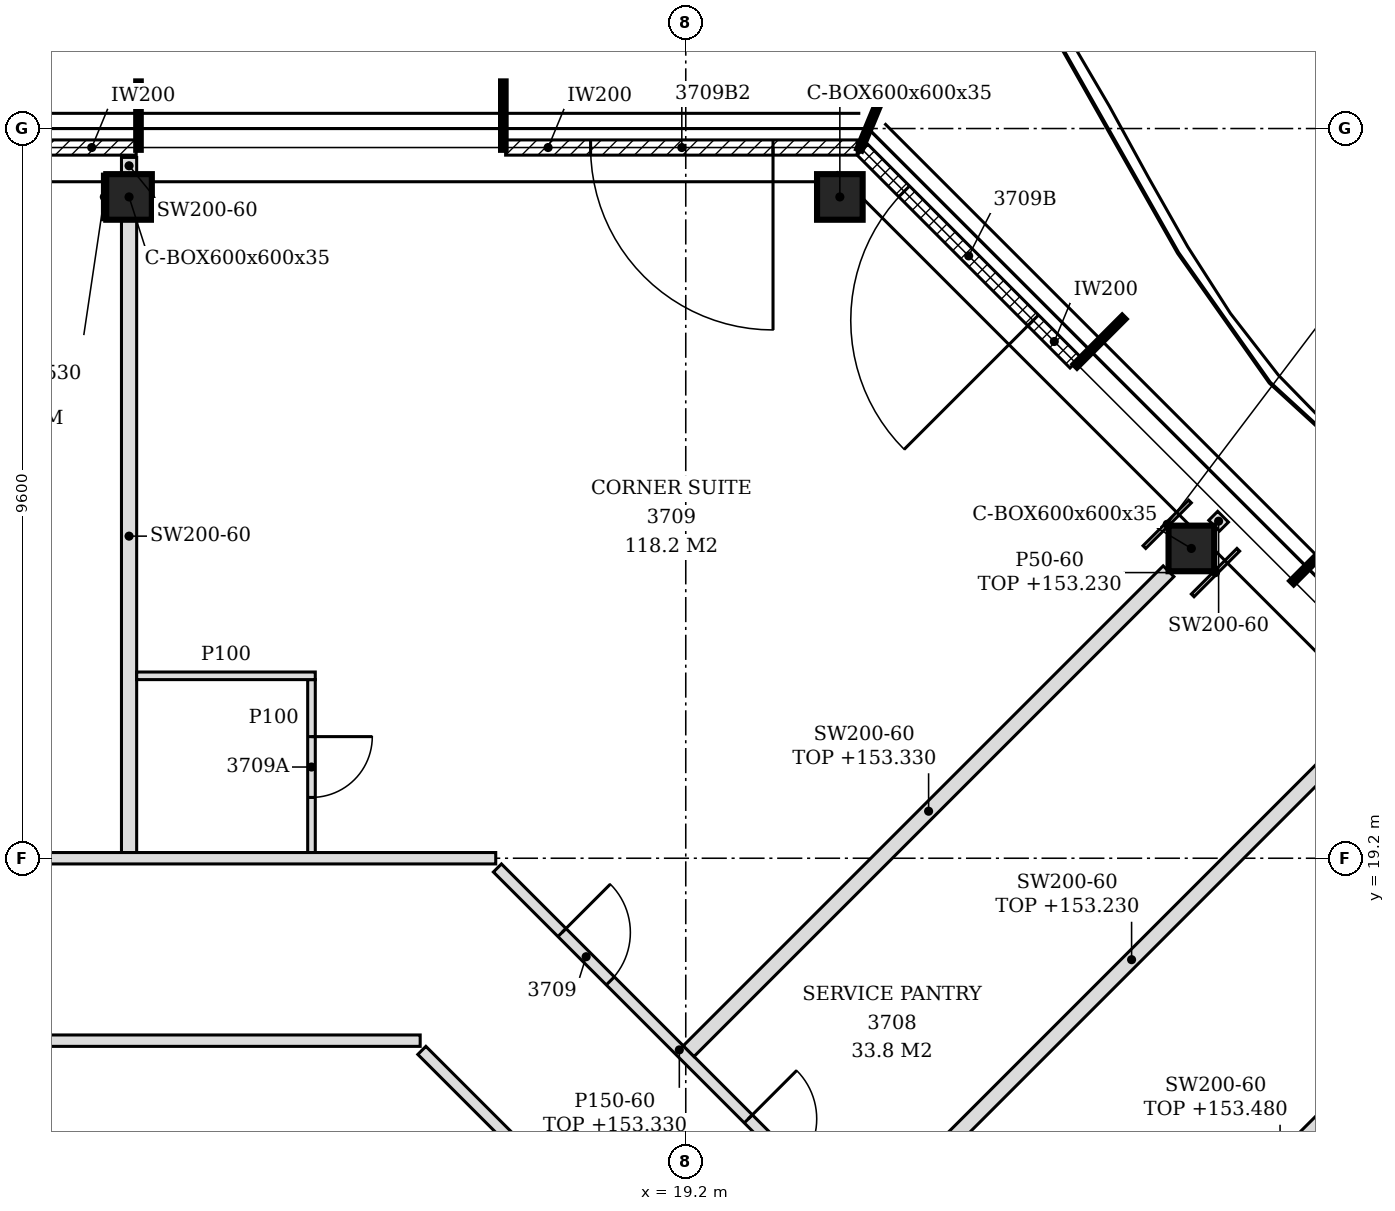
"""IFC4 building model, lengths in metres.
Left out: names, types, materials, properties, quantities, classifications, styles, units other than length and angle.
Written with IfcOpenShell. Run it as: python <this file> out.ifc"""

import sys

from ifc_helpers import new_model, si_unit, direction, frame, frame_2d, origin, origin_2d, place, context, subcontext, project, spatial, polyline, rectangle, hollow_rectangle, outline, extrude, element, fill, save


model = new_model("IFC4")
c1 = context("Model", 3, precision=1e-05, world=origin(), true_north=direction((0.0, 1.0)))
c2 = subcontext(c1, "Body", "Model", "MODEL_VIEW")
j1 = project(units=[si_unit("LENGTHUNIT", "METRE"), si_unit("PLANEANGLEUNIT", "RADIAN")], contexts=[c1])
p1 = place(None, origin())
s1 = spatial("IfcSite", under=j1, at=p1, CompositionType="ELEMENT")
p2 = place(p1, origin())
s2 = spatial("IfcBuilding", under=s1, at=p2, CompositionType="ELEMENT")
p3 = place(p2, frame((0.0, 0.0, 150.6)))
s3 = spatial("IfcBuildingStorey", under=s2, at=p3, CompositionType="ELEMENT", Elevation=150.6)
for number, where, z_axis, x_axis in (
    (1, (25.852, 23.276, -0.15), (0.0, 0.0, 1.0), (1.0, 0.0, 0.0)),
    (2, (21.227, 27.9, -0.15), (0.0, 0.0, 1.0), (1.0, 0.0, 0.0)),
    (3, (11.876, 27.9, -0.15), (0.0, 0.0, 1.0), (1.0, 0.0, 0.0)),
):
    element("IfcColumn", number, at=place(p3, frame(where, z_axis=z_axis, x_axis=x_axis)), inside=s3, PredefinedType="COLUMN", context=c2, shape_type="SweptSolid", body=[
        extrude(hollow_rectangle(XDim=0.6, YDim=0.6, WallThickness=0.035, at=origin_2d()), origin(), (0.0, 0.0, 1.0), 3.6),
    ])
p4 = place(p3, frame((24.326, 25.72, 0.0), z_axis=(0.0, 0.0, 1.0), x_axis=(-0.707106781187, 0.707106781187, 0.0)))
e4 = element("IfcWall", 4, at=p4, inside=s3, PredefinedType="NOTDEFINED", context=c2, shape_type="SweptSolid", body=[
    extrude(rectangle(XDim=3.962, YDim=0.2, at=frame_2d((1.981, 0.0))), origin(), (0.0, 0.0, 1.0), 3.45),
])
p5 = place(p4, frame((0.786, 0.0, 0.0)))
e5 = element("IfcOpeningElement", 5, at=p5, cuts=e4, PredefinedType="OPENING", context=c2, shape_type="SweptSolid", body=[
    extrude(rectangle(XDim=2.4, YDim=2.4, at=frame_2d((1.2, 1.2))), frame((0.0, 0.11, 0.0), z_axis=(0.0, -1.0, 0.0), x_axis=(1.0, 0.0, 0.0)), (0.0, 0.0, 1.0), 0.22),
])
p6 = place(p3, frame((21.457, 28.55, 0.0), z_axis=(0.0, 0.0, 1.0), x_axis=(-1.0, 0.0, 0.0)))
e6 = element("IfcWall", 6, at=p6, inside=s3, PredefinedType="NOTDEFINED", context=c2, shape_type="SweptSolid", body=[
    extrude(rectangle(XDim=4.626, YDim=0.2, at=frame_2d((2.313, 0.0))), origin(), (0.0, 0.0, 1.0), 3.45),
])
p7 = place(p6, frame((1.108, 0.0, 0.0)))
e7 = element("IfcOpeningElement", 7, at=p7, cuts=e6, PredefinedType="OPENING", context=c2, shape_type="SweptSolid", body=[
    extrude(rectangle(XDim=2.4, YDim=2.4, at=frame_2d((1.2, 1.2))), frame((0.0, 0.11, 0.0), z_axis=(0.0, -1.0, 0.0), x_axis=(1.0, 0.0, 0.0)), (0.0, 0.0, 1.0), 0.22),
])
p8 = place(p3, frame((11.97, 28.55, 0.0), z_axis=(0.0, 0.0, 1.0), x_axis=(-1.0, 0.0, 0.0)))
e8 = element("IfcWall", 8, at=p8, inside=s3, PredefinedType="NOTDEFINED", context=c2, shape_type="SweptSolid", body=[
    extrude(rectangle(XDim=4.74, YDim=0.2, at=frame_2d((2.37, 0.0))), origin(), (0.0, 0.0, 1.0), 3.45),
])
p9 = place(p8, frame((1.17, 0.0, 0.0)))
e9 = element("IfcOpeningElement", 9, at=p9, cuts=e8, PredefinedType="OPENING", context=c2, shape_type="SweptSolid", body=[
    extrude(rectangle(XDim=2.4, YDim=2.4, at=frame_2d((1.2, 1.2))), frame((0.0, 0.11, 0.0), z_axis=(0.0, -1.0, 0.0), x_axis=(1.0, 0.0, 0.0)), (0.0, 0.0, 1.0), 0.22),
])
p10 = place(p3, frame((26.272, 9.522, 0.0), z_axis=(0.0, 0.0, 1.0), x_axis=(-0.707097742657, 0.707115819601, 0.0)))
e10 = element("IfcWall", 10, at=p10, inside=s3, PredefinedType="PARTITIONING", context=c2, shape_type="SweptSolid", body=[
    extrude(rectangle(XDim=13.506, YDim=0.15, at=frame_2d((6.753, 0.0))), origin(), (0.0, 0.0, 1.0), 2.73),
])
p11 = place(p10, frame((1.398, 0.0, 0.0)))
e11 = element("IfcOpeningElement", 11, at=p11, cuts=e10, PredefinedType="OPENING", context=c2, shape_type="SweptSolid", body=[
    extrude(rectangle(XDim=0.9, YDim=2.1, at=frame_2d((0.45, 1.05))), frame((0.0, 0.085, 0.0), z_axis=(0.0, -1.0, 0.0), x_axis=(1.0, 0.0, 0.0)), (0.0, 0.0, 1.0), 0.17),
])
p12 = place(p10, frame((4.668, 0.0, 0.0)))
e12 = element("IfcOpeningElement", 12, at=p12, cuts=e10, PredefinedType="OPENING", context=c2, shape_type="SweptSolid", body=[
    extrude(rectangle(XDim=0.9, YDim=2.1, at=frame_2d((0.45, 1.05))), frame((0.0, 0.085, 0.0), z_axis=(0.0, -1.0, 0.0), x_axis=(1.0, 0.0, 0.0)), (0.0, 0.0, 1.0), 0.17),
])
p13 = place(p10, frame((7.938, 0.0, 0.0)))
e13 = element("IfcOpeningElement", 13, at=p13, cuts=e10, PredefinedType="OPENING", context=c2, shape_type="SweptSolid", body=[
    extrude(rectangle(XDim=0.9, YDim=2.1, at=frame_2d((0.45, 1.05))), frame((0.0, 0.085, 0.0), z_axis=(0.0, -1.0, 0.0), x_axis=(1.0, 0.0, 0.0)), (0.0, 0.0, 1.0), 0.17),
])
p14 = place(p10, frame((11.405, 0.0, 0.0)))
e14 = element("IfcOpeningElement", 14, at=p14, cuts=e10, PredefinedType="OPENING", context=c2, shape_type="SweptSolid", body=[
    extrude(rectangle(XDim=0.9, YDim=2.1, at=frame_2d((0.45, 1.05))), frame((0.0, 0.085, 0.0), z_axis=(0.0, -1.0, 0.0), x_axis=(1.0, 0.0, 0.0)), (0.0, 0.0, 1.0), 0.17),
])
p15 = place(p3, frame((26.174, 9.726, 0.0), z_axis=(0.0, 0.0, 1.0), x_axis=(0.707106781187, 0.707106781187, 0.0)))
e15 = element("IfcWall", 15, at=p15, inside=s3, PredefinedType="PARTITIONING", context=c2, shape_type="SweptSolid", body=[
    extrude(rectangle(XDim=9.873, YDim=0.1, at=frame_2d((4.937, 0.0))), origin(), (0.0, 0.0, 1.0), 2.88),
])
p16 = place(p15, frame((4.639, 0.0, 0.0)))
e16 = element("IfcOpeningElement", 16, at=p16, cuts=e15, PredefinedType="OPENING", context=c2, shape_type="SweptSolid", body=[
    extrude(rectangle(XDim=0.9, YDim=2.1, at=frame_2d((0.45, 1.05))), frame((0.0, 0.06, 0.0), z_axis=(0.0, -1.0, 0.0), x_axis=(1.0, 0.0, 0.0)), (0.0, 0.0, 1.0), 0.12),
])
p17 = place(p3, frame((23.862, 12.038, 0.0), z_axis=(0.0, 0.0, 1.0), x_axis=(0.707106781187, 0.707106781187, 0.0)))
e17 = element("IfcWall", 17, at=p17, inside=s3, PredefinedType="PARTITIONING", context=c2, shape_type="SweptSolid", body=[
    extrude(rectangle(XDim=8.929, YDim=0.2, at=frame_2d((4.464, 0.0))), origin(), (0.0, 0.0, 1.0), 2.88),
])
p18 = place(p3, frame((19.002, 13.398, 0.0), z_axis=(0.0, 0.0, 1.0), x_axis=(-0.707080416772, 0.707133144618, 0.0)))
e18 = element("IfcWall", 18, at=p18, inside=s3, PredefinedType="PARTITIONING", context=c2, shape_type="SweptSolid", body=[
    extrude(rectangle(XDim=4.63, YDim=0.15, at=frame_2d((2.315, 0.0))), origin(), (0.0, 0.0, 1.0), 3.45),
])
p19 = place(p3, frame((21.55, 14.35, 0.0), z_axis=(0.0, 0.0, 1.0), x_axis=(0.707106781187, 0.707106781187, 0.0)))
e19 = element("IfcWall", 19, at=p19, inside=s3, PredefinedType="PARTITIONING", context=c2, shape_type="SweptSolid", body=[
    extrude(rectangle(XDim=9.943, YDim=0.2, at=frame_2d((4.972, 0.0))), origin(), (0.0, 0.0, 1.0), 2.63),
])
p20 = place(p3, frame((19.238, 16.662, 0.0), z_axis=(0.0, 0.0, 1.0), x_axis=(0.707106781187, 0.707106781187, 0.0)))
e20 = element("IfcWall", 20, at=p20, inside=s3, PredefinedType="PARTITIONING", context=c2, shape_type="SweptSolid", body=[
    extrude(rectangle(XDim=8.929, YDim=0.2, at=frame_2d((4.464, 0.0))), origin(), (0.0, 0.0, 1.0), 2.73),
])
p21 = place(p3, frame((-1.306, 16.8, 0.0), z_axis=(0.0, 0.0, 1.0), x_axis=(1.0, 0.0, 0.0)))
e21 = element("IfcWall", 21, at=p21, inside=s3, PredefinedType="PARTITIONING", context=c2, shape_type="SweptSolid", body=[
    extrude(outline(polyline([(0.0, 0.0), (17.012, 0.0), (17.012, 3.45), (8.656, 3.45), (8.654, 2.73), (8.356, 2.73), (8.354, 3.45), (0.0, 3.45), (0.0, 0.0)])), frame((0.0, 0.075, 0.0), z_axis=(0.0, -1.0, 0.0), x_axis=(1.0, 0.0, 0.0)), (0.0, 0.0, 1.0), 0.15),
])
p22 = place(p3, frame((-2.3, 19.2, 0.0), z_axis=(0.0, 0.0, 1.0), x_axis=(1.0, 0.0, 0.0)))
e22 = element("IfcWall", 22, at=p22, inside=s3, PredefinedType="PARTITIONING", context=c2, shape_type="SweptSolid", body=[
    extrude(outline(polyline([(0.0, 0.0), (19.0, 0.0), (19.0, 2.88), (9.65, 2.88), (9.648, 2.73), (9.35, 2.73), (9.348, 2.88), (0.0, 2.88), (0.0, 0.0)])), frame((0.0, 0.075, 0.0), z_axis=(0.0, -1.0, 0.0), x_axis=(1.0, 0.0, 0.0)), (0.0, 0.0, 1.0), 0.15),
])
p23 = place(p22, frame((11.809, 0.0, 0.0)))
e23 = element("IfcOpeningElement", 23, at=p23, cuts=e22, PredefinedType="OPENING", context=c2, shape_type="SweptSolid", body=[
    extrude(rectangle(XDim=0.9, YDim=2.1, at=frame_2d((0.45, 1.05))), frame((0.0, 0.085, 0.0), z_axis=(0.0, -1.0, 0.0), x_axis=(1.0, 0.0, 0.0)), (0.0, 0.0, 1.0), 0.17),
])
p24 = place(p3, frame((11.876, 19.275, 0.0), z_axis=(0.0, 0.0, 1.0), x_axis=(0.0, 1.0, 0.0)))
e24 = element("IfcWall", 24, at=p24, inside=s3, PredefinedType="PARTITIONING", context=c2, shape_type="SweptSolid", body=[
    extrude(outline(polyline([(0.0, 0.0), (8.325, 0.0), (8.325, 3.45), (4.83, 3.45), (4.828, 2.88), (4.62, 2.88), (4.618, 3.45), (0.03, 3.45), (0.028, 2.88), (0.0, 2.88), (0.0, 0.0)])), frame((0.0, 0.1, 0.0), z_axis=(0.0, -1.0, 0.0), x_axis=(1.0, 0.0, 0.0)), (0.0, 0.0, 1.0), 0.2),
])
p25 = place(p3, frame((14.276, 19.275, 0.0), z_axis=(0.0, 0.0, 1.0), x_axis=(0.0, 1.0, 0.0)))
e25 = element("IfcWall", 25, at=p25, inside=s3, PredefinedType="PARTITIONING", context=c2, shape_type="SweptSolid", body=[
    extrude(outline(polyline([(0.0, 0.0), (2.275, 0.0), (2.275, 3.45), (0.03, 3.45), (0.028, 2.88), (0.0, 2.88), (0.0, 0.0)])), frame((0.0, 0.05, 0.0), z_axis=(0.0, -1.0, 0.0), x_axis=(1.0, 0.0, 0.0)), (0.0, 0.0, 1.0), 0.1),
])
p26 = place(p25, frame((0.725, 0.0, 0.0)))
e26 = element("IfcOpeningElement", 26, at=p26, cuts=e25, PredefinedType="OPENING", context=c2, shape_type="SweptSolid", body=[
    extrude(rectangle(XDim=0.8, YDim=2.1, at=frame_2d((0.4, 1.05))), frame((0.0, 0.06, 0.0), z_axis=(0.0, -1.0, 0.0), x_axis=(1.0, 0.0, 0.0)), (0.0, 0.0, 1.0), 0.12),
])
p27 = place(p3, frame((11.976, 21.6, 0.0), z_axis=(0.0, 0.0, 1.0), x_axis=(1.0, 0.0, 0.0)))
e27 = element("IfcWall", 27, at=p27, inside=s3, PredefinedType="PARTITIONING", context=c2, shape_type="SweptSolid", body=[
    extrude(rectangle(XDim=2.35, YDim=0.1, at=frame_2d((1.175, 0.0))), origin(), (0.0, 0.0, 1.0), 3.45),
])
p28 = place(p3, frame((26.152, 23.576, 0.0), z_axis=(0.0, 0.0, 1.0), x_axis=(0.707106781187, 0.707106781187, 0.0)))
e28 = element("IfcWall", 28, at=p28, inside=s3, PredefinedType="PARTITIONING", context=c2, shape_type="SweptSolid", body=[
    extrude(rectangle(XDim=0.166, YDim=0.2, at=frame_2d((0.083, 0.0))), origin(), (0.0, 0.0, 1.0), 3.45),
])
p29 = place(p3, frame((11.876, 28.2, 0.0), z_axis=(0.0, 0.0, 1.0), x_axis=(0.0, 1.0, 0.0)))
e29 = element("IfcWall", 29, at=p29, inside=s3, PredefinedType="PARTITIONING", context=c2, shape_type="SweptSolid", body=[
    extrude(rectangle(XDim=0.22, YDim=0.2, at=frame_2d((0.11, 0.0))), origin(), (0.0, 0.0, 1.0), 3.45),
])
p30 = place(p3, frame((25.234, 23.293, 0.0), z_axis=(0.0, 0.0, 1.0), x_axis=(0.707106781187, 0.707106781187, 0.0)))
e30 = element("IfcWall", 30, at=p30, inside=s3, PredefinedType="PARTITIONING", context=c2, shape_type="SweptSolid", body=[
    extrude(rectangle(XDim=0.848, YDim=0.05, at=frame_2d((0.424, 0.0))), origin(), (0.0, 0.0, 1.0), 2.93),
])
p31 = place(p3, frame((25.869, 22.658, 0.0), z_axis=(0.0, 0.0, 1.0), x_axis=(0.707106781187, 0.707106781187, 0.0)))
e31 = element("IfcWall", 31, at=p31, inside=s3, PredefinedType="PARTITIONING", context=c2, shape_type="SweptSolid", body=[
    extrude(rectangle(XDim=0.849, YDim=0.05, at=frame_2d((0.424, 0.0))), origin(), (0.0, 0.0, 1.0), 2.63),
])
p32 = place(p3, frame((11.551, 27.6, 0.0), z_axis=(0.0, 0.0, 1.0), x_axis=(0.0, 1.0, 0.0)))
e32 = element("IfcWall", 32, at=p32, inside=s3, PredefinedType="PARTITIONING", context=c2, shape_type="SweptSolid", body=[
    extrude(rectangle(XDim=0.6, YDim=0.05, at=frame_2d((0.3, 0.0))), origin(), (0.0, 0.0, 1.0), 2.93),
])
p33 = place(p5, origin())
e33 = element("IfcDoor", 33, at=p33, inside=s3, OperationType="SINGLE_SWING_LEFT", PredefinedType="DOOR", context=c2, shape_type="SweptSolid", body=[
    extrude(rectangle(XDim=2.4, YDim=2.4, at=frame_2d((1.2, 1.2))), frame((0.0, 0.025, 0.0), z_axis=(0.0, -1.0, 0.0), x_axis=(1.0, 0.0, 0.0)), (0.0, 0.0, 1.0), 0.05),
])
fill(e5, e33)
p34 = place(p7, origin())
e34 = element("IfcDoor", 34, at=p34, inside=s3, OperationType="SINGLE_SWING_LEFT", PredefinedType="DOOR", context=c2, shape_type="SweptSolid", body=[
    extrude(rectangle(XDim=2.4, YDim=2.4, at=frame_2d((1.2, 1.2))), frame((0.0, 0.025, 0.0), z_axis=(0.0, -1.0, 0.0), x_axis=(1.0, 0.0, 0.0)), (0.0, 0.0, 1.0), 0.05),
])
fill(e7, e34)
p35 = place(p13, frame((0.9, 0.0, 0.0), z_axis=(0.0, 0.0, 1.0), x_axis=(-1.0, 0.0, 0.0)))
e35 = element("IfcDoor", 35, at=p35, inside=s3, OperationType="SINGLE_SWING_LEFT", PredefinedType="DOOR", context=c2, shape_type="SweptSolid", body=[
    extrude(rectangle(XDim=0.9, YDim=2.1, at=frame_2d((0.45, 1.05))), frame((0.0, 0.025, 0.0), z_axis=(0.0, -1.0, 0.0), x_axis=(1.0, 0.0, 0.0)), (0.0, 0.0, 1.0), 0.05),
])
fill(e13, e35)
p36 = place(p14, frame((0.9, 0.0, 0.0), z_axis=(0.0, 0.0, 1.0), x_axis=(-1.0, 0.0, 0.0)))
e36 = element("IfcDoor", 36, at=p36, inside=s3, OperationType="SINGLE_SWING_LEFT", PredefinedType="DOOR", context=c2, shape_type="SweptSolid", body=[
    extrude(rectangle(XDim=0.9, YDim=2.1, at=frame_2d((0.45, 1.05))), frame((0.0, 0.025, 0.0), z_axis=(0.0, -1.0, 0.0), x_axis=(1.0, 0.0, 0.0)), (0.0, 0.0, 1.0), 0.05),
])
fill(e14, e36)
p37 = place(p26, frame((0.8, 0.0, 0.0), z_axis=(0.0, 0.0, 1.0), x_axis=(-1.0, 0.0, 0.0)))
e37 = element("IfcDoor", 37, at=p37, inside=s3, OperationType="SINGLE_SWING_LEFT", PredefinedType="DOOR", context=c2, shape_type="SweptSolid", body=[
    extrude(rectangle(XDim=0.8, YDim=2.1, at=frame_2d((0.4, 1.05))), frame((0.0, 0.025, 0.0), z_axis=(0.0, -1.0, 0.0), x_axis=(1.0, 0.0, 0.0)), (0.0, 0.0, 1.0), 0.05),
])
fill(e26, e37)
save(model, sys.argv[1])
